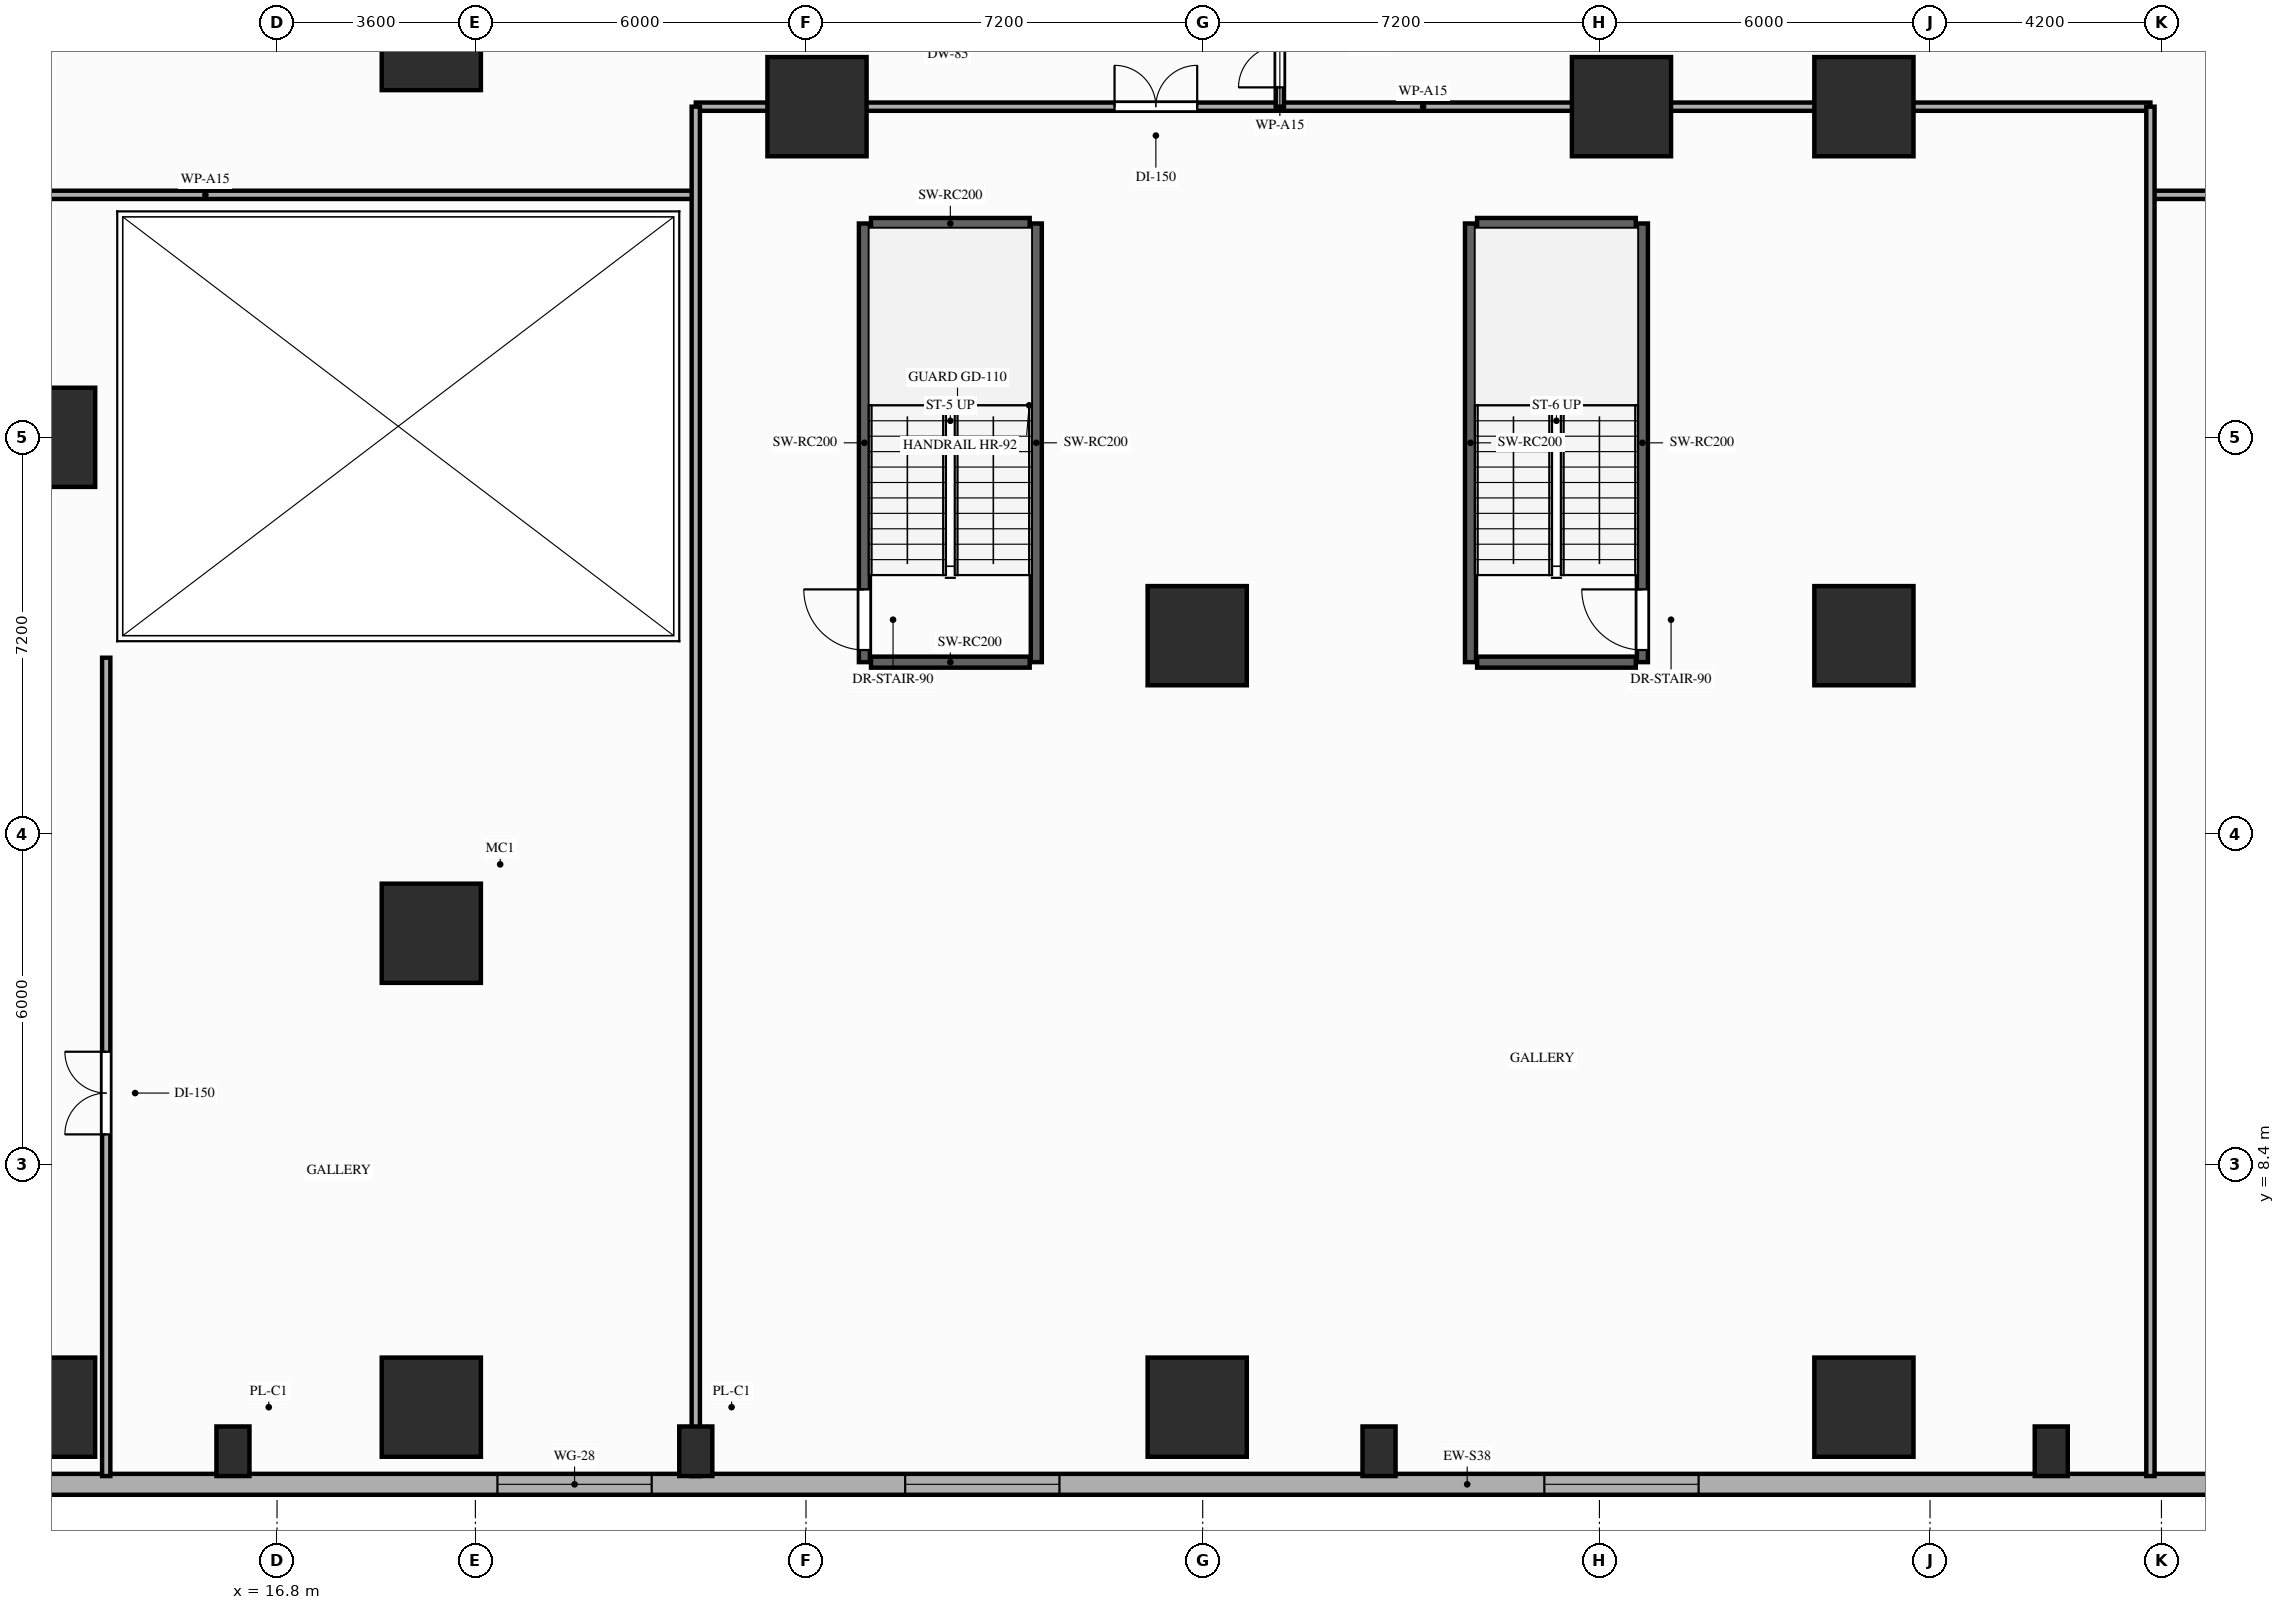
"""IFC4 building model, lengths in metres.
Left out: names, types, materials, properties, quantities, classifications, styles, units other than length and angle.
Written with IfcOpenShell. Run it as: python <this file> out.ifc"""

import sys

from ifc_helpers import new_model, si_unit, direction, frame, frame_2d, origin, origin_2d, place, context, subcontext, project, spatial, rectangle, extrude, element, fill, save


model = new_model("IFC4")
c1 = context("Model", 3, precision=1e-05, world=origin(), true_north=direction((0.0, 1.0)))
c2 = subcontext(c1, "Body", "Model", "MODEL_VIEW")
j1 = project(units=[si_unit("LENGTHUNIT", "METRE"), si_unit("PLANEANGLEUNIT", "RADIAN")], contexts=[c1])
p1 = place(None, origin())
s1 = spatial("IfcSite", under=j1, at=p1, CompositionType="ELEMENT")
p2 = place(p1, origin())
s2 = spatial("IfcBuilding", under=s1, at=p2, CompositionType="ELEMENT")
p3 = place(p2, frame((0.0, 0.0, 4.6)))
s3 = spatial("IfcBuildingStorey", under=s2, at=p3, CompositionType="ELEMENT", Elevation=4.6)
for number, where, z_axis, x_axis in (
    (1, (19.6, 12.6, 0.0), (0.0, 0.0, 1.0), (1.0, 0.0, 0.0)),
    (2, (19.6, 28.8, 0.0), (0.0, 0.0, 1.0), (1.0, 0.0, 0.0)),
    (3, (26.6, 27.6, 0.0), (0.0, 0.0, 1.0), (1.0, 0.0, 0.0)),
    (4, (41.2, 27.6, 0.0), (0.0, 0.0, 1.0), (1.0, 0.0, 0.0)),
    (5, (45.6, 27.6, 0.0), (0.0, 0.0, 1.0), (1.0, 0.0, 0.0)),
    (6, (12.6, 4.0, 0.0), (0.0, 0.0, 1.0), (1.0, 0.0, 0.0)),
    (7, (19.6, 4.0, 0.0), (0.0, 0.0, 1.0), (1.0, 0.0, 0.0)),
    (8, (33.5, 4.0, 0.0), (0.0, 0.0, 1.0), (1.0, 0.0, 0.0)),
    (9, (45.6, 4.0, 0.0), (0.0, 0.0, 1.0), (1.0, 0.0, 0.0)),
    (10, (12.6, 21.6, 0.0), (0.0, 0.0, 1.0), (1.0, 0.0, 0.0)),
    (11, (33.5, 18.0, 0.0), (0.0, 0.0, 1.0), (1.0, 0.0, 0.0)),
    (12, (45.6, 18.0, 0.0), (0.0, 0.0, 1.0), (1.0, 0.0, 0.0)),
):
    element("IfcColumn", number, at=place(p3, frame(where, z_axis=z_axis, x_axis=x_axis)), inside=s3, PredefinedType="COLUMN", context=c2, shape_type="SweptSolid", body=[
        extrude(rectangle(XDim=1.8, YDim=1.8, at=origin_2d()), origin(), (0.0, 0.0, 1.0), 4.2),
    ])
for number, where, z_axis, x_axis in (
    (13, (16.0, 3.2, 0.0), (0.0, 0.0, 1.0), (1.0, 0.0, 0.0)),
    (14, (24.4, 3.2, 0.0), (0.0, 0.0, 1.0), (1.0, 0.0, 0.0)),
    (15, (36.8, 3.2, 0.0), (0.0, 0.0, 1.0), (1.0, 0.0, 0.0)),
    (16, (49.0, 3.2, 0.0), (0.0, 0.0, 1.0), (1.0, 0.0, 0.0)),
):
    element("IfcColumn", number, at=place(p3, frame(where, z_axis=z_axis, x_axis=x_axis)), inside=s3, PredefinedType="PILASTER", context=c2, shape_type="SweptSolid", body=[
        extrude(rectangle(XDim=0.6, YDim=0.9, at=origin_2d()), origin(), (0.0, 0.0, 1.0), 4.2),
    ])
p4 = place(p3, frame((3.6, 2.6, 0.0), z_axis=(0.0, 0.0, 1.0), x_axis=(1.0, 0.0, 0.0)))
e17 = element("IfcWall", 17, at=p4, inside=s3, PredefinedType="STANDARD", context=c2, shape_type="SweptSolid", body=[
    extrude(rectangle(XDim=69.6, YDim=0.38, at=frame_2d((34.8, 0.0))), origin(), (0.0, 0.0, 1.0), 3.95),
])
p5 = place(p4, frame((17.2, 0.0, 0.9)))
e18 = element("IfcOpeningElement", 18, at=p5, cuts=e17, PredefinedType="OPENING", context=c2, shape_type="SweptSolid", body=[
    extrude(rectangle(XDim=2.8, YDim=2.2, at=frame_2d((1.4, 1.1))), frame((0.0, 0.2, 0.0), z_axis=(0.0, -1.0, 0.0), x_axis=(1.0, 0.0, 0.0)), (0.0, 0.0, 1.0), 0.4),
])
p6 = place(p4, frame((24.6, 0.0, 0.9)))
e19 = element("IfcOpeningElement", 19, at=p6, cuts=e17, PredefinedType="OPENING", context=c2, shape_type="SweptSolid", body=[
    extrude(rectangle(XDim=2.8, YDim=2.2, at=frame_2d((1.4, 1.1))), frame((0.0, 0.2, 0.0), z_axis=(0.0, -1.0, 0.0), x_axis=(1.0, 0.0, 0.0)), (0.0, 0.0, 1.0), 0.4),
])
p7 = place(p4, frame((36.2, 0.0, 0.9)))
e20 = element("IfcOpeningElement", 20, at=p7, cuts=e17, PredefinedType="OPENING", context=c2, shape_type="SweptSolid", body=[
    extrude(rectangle(XDim=2.8, YDim=2.2, at=frame_2d((1.4, 1.1))), frame((0.0, 0.2, 0.0), z_axis=(0.0, -1.0, 0.0), x_axis=(1.0, 0.0, 0.0)), (0.0, 0.0, 1.0), 0.4),
])
p8 = place(p4, frame((48.4, 0.0, 0.9)))
e21 = element("IfcOpeningElement", 21, at=p8, cuts=e17, PredefinedType="OPENING", context=c2, shape_type="SweptSolid", body=[
    extrude(rectangle(XDim=2.8, YDim=2.2, at=frame_2d((1.4, 1.1))), frame((0.0, 0.2, 0.0), z_axis=(0.0, -1.0, 0.0), x_axis=(1.0, 0.0, 0.0)), (0.0, 0.0, 1.0), 0.4),
])
p9 = place(p4, frame((64.0, 0.0, 0.9)))
e22 = element("IfcOpeningElement", 22, at=p9, cuts=e17, PredefinedType="OPENING", context=c2, shape_type="SweptSolid", body=[
    extrude(rectangle(XDim=2.8, YDim=2.2, at=frame_2d((1.4, 1.1))), frame((0.0, 0.2, 0.0), z_axis=(0.0, -1.0, 0.0), x_axis=(1.0, 0.0, 0.0)), (0.0, 0.0, 1.0), 0.4),
])
p10 = place(p3, frame((27.46, 17.52, 0.0), z_axis=(0.0, 0.0, 1.0), x_axis=(0.0, 1.0, 0.0)))
e23 = element("IfcWall", 23, at=p10, inside=s3, PredefinedType="SHEAR", context=c2, shape_type="SweptSolid", body=[
    extrude(rectangle(XDim=7.96, YDim=0.2, at=frame_2d((3.98, 0.0))), origin(), (0.0, 0.0, 1.0), 3.95),
])
p11 = place(p10, frame((0.22, 0.0, 0.0)))
e24 = element("IfcOpeningElement", 24, at=p11, cuts=e23, PredefinedType="OPENING", context=c2, shape_type="SweptSolid", body=[
    extrude(rectangle(XDim=1.1, YDim=2.15, at=frame_2d((0.55, 1.075))), frame((0.0, 0.11, 0.0), z_axis=(0.0, -1.0, 0.0), x_axis=(1.0, 0.0, 0.0)), (0.0, 0.0, 1.0), 0.22),
])
p12 = place(p3, frame((30.58, 17.52, 0.0), z_axis=(0.0, 0.0, 1.0), x_axis=(0.0, 1.0, 0.0)))
e25 = element("IfcWall", 25, at=p12, inside=s3, PredefinedType="SHEAR", context=c2, shape_type="SweptSolid", body=[
    extrude(rectangle(XDim=7.96, YDim=0.2, at=frame_2d((3.98, 0.0))), origin(), (0.0, 0.0, 1.0), 3.95),
])
for number, where, z_axis, x_axis in (
    (26, (27.58, 25.48, 0.0), (0.0, 0.0, 1.0), (1.0, 0.0, 0.0)),
    (27, (27.58, 17.52, 0.0), (0.0, 0.0, 1.0), (1.0, 0.0, 0.0)),
):
    element("IfcWall", number, at=place(p3, frame(where, z_axis=z_axis, x_axis=x_axis)), inside=s3, PredefinedType="SHEAR", context=c2, shape_type="SweptSolid", body=[
        extrude(rectangle(XDim=2.88, YDim=0.2, at=frame_2d((1.44, 0.0))), origin(), (0.0, 0.0, 1.0), 3.95),
    ])
p13 = place(p3, frame((38.46, 17.52, 0.0), z_axis=(0.0, 0.0, 1.0), x_axis=(0.0, 1.0, 0.0)))
e28 = element("IfcWall", 28, at=p13, inside=s3, PredefinedType="SHEAR", context=c2, shape_type="SweptSolid", body=[
    extrude(rectangle(XDim=7.96, YDim=0.2, at=frame_2d((3.98, 0.0))), origin(), (0.0, 0.0, 1.0), 3.95),
])
p14 = place(p3, frame((41.58, 17.52, 0.0), z_axis=(0.0, 0.0, 1.0), x_axis=(0.0, 1.0, 0.0)))
e29 = element("IfcWall", 29, at=p14, inside=s3, PredefinedType="SHEAR", context=c2, shape_type="SweptSolid", body=[
    extrude(rectangle(XDim=7.96, YDim=0.2, at=frame_2d((3.98, 0.0))), origin(), (0.0, 0.0, 1.0), 3.95),
])
p15 = place(p14, frame((0.22, 0.0, 0.0)))
e30 = element("IfcOpeningElement", 30, at=p15, cuts=e29, PredefinedType="OPENING", context=c2, shape_type="SweptSolid", body=[
    extrude(rectangle(XDim=1.1, YDim=2.15, at=frame_2d((0.55, 1.075))), frame((0.0, 0.11, 0.0), z_axis=(0.0, -1.0, 0.0), x_axis=(1.0, 0.0, 0.0)), (0.0, 0.0, 1.0), 0.22),
])
for number, where, z_axis, x_axis in (
    (31, (38.58, 25.48, 0.0), (0.0, 0.0, 1.0), (1.0, 0.0, 0.0)),
    (32, (38.58, 17.52, 0.0), (0.0, 0.0, 1.0), (1.0, 0.0, 0.0)),
):
    element("IfcWall", number, at=place(p3, frame(where, z_axis=z_axis, x_axis=x_axis)), inside=s3, PredefinedType="SHEAR", context=c2, shape_type="SweptSolid", body=[
        extrude(rectangle(XDim=2.88, YDim=0.2, at=frame_2d((1.44, 0.0))), origin(), (0.0, 0.0, 1.0), 3.95),
    ])
p16 = place(p3, frame((6.6, 26.0, 0.0), z_axis=(0.0, 0.0, 1.0), x_axis=(1.0, 0.0, 0.0)))
e33 = element("IfcWall", 33, at=p16, inside=s3, PredefinedType="PARTITIONING", context=c2, shape_type="SweptSolid", body=[
    extrude(rectangle(XDim=17.8, YDim=0.15, at=frame_2d((8.9, 0.0))), origin(), (0.0, 0.0, 1.0), 3.23),
])
p17 = place(p3, frame((24.4, 27.6, 0.0), z_axis=(0.0, 0.0, 1.0), x_axis=(1.0, 0.0, 0.0)))
e34 = element("IfcWall", 34, at=p17, inside=s3, PredefinedType="PARTITIONING", context=c2, shape_type="SweptSolid", body=[
    extrude(rectangle(XDim=26.4, YDim=0.15, at=frame_2d((13.2, 0.0))), origin(), (0.0, 0.0, 1.0), 3.23),
])
p18 = place(p17, frame((7.6, 0.0, 0.0)))
e35 = element("IfcOpeningElement", 35, at=p18, cuts=e34, PredefinedType="OPENING", context=c2, shape_type="SweptSolid", body=[
    extrude(rectangle(XDim=1.5, YDim=2.18, at=frame_2d((0.75, 1.09))), frame((0.0, 0.085, 0.0), z_axis=(0.0, -1.0, 0.0), x_axis=(1.0, 0.0, 0.0)), (0.0, 0.0, 1.0), 0.17),
])
p19 = place(p3, frame((50.8, 26.0, 0.0), z_axis=(0.0, 0.0, 1.0), x_axis=(1.0, 0.0, 0.0)))
e36 = element("IfcWall", 36, at=p19, inside=s3, PredefinedType="PARTITIONING", context=c2, shape_type="SweptSolid", body=[
    extrude(rectangle(XDim=11.6, YDim=0.15, at=frame_2d((5.8, 0.0))), origin(), (0.0, 0.0, 1.0), 3.23),
])
p20 = place(p19, frame((3.7, 0.0, 0.0)))
e37 = element("IfcOpeningElement", 37, at=p20, cuts=e36, PredefinedType="OPENING", context=c2, shape_type="SweptSolid", body=[
    extrude(rectangle(XDim=1.5, YDim=2.18, at=frame_2d((0.75, 1.09))), frame((0.0, 0.085, 0.0), z_axis=(0.0, -1.0, 0.0), x_axis=(1.0, 0.0, 0.0)), (0.0, 0.0, 1.0), 0.17),
])
p21 = place(p3, frame((35.0, 27.6, 0.0), z_axis=(0.0, 0.0, 1.0), x_axis=(0.0, 1.0, 0.0)))
e38 = element("IfcWall", 38, at=p21, inside=s3, PredefinedType="PARTITIONING", context=c2, shape_type="SweptSolid", body=[
    extrude(rectangle(XDim=2.2, YDim=0.15, at=frame_2d((1.1, 0.0))), origin(), (0.0, 0.0, 1.0), 3.23),
])
p22 = place(p21, frame((0.35, 0.0, 0.0)))
e39 = element("IfcOpeningElement", 39, at=p22, cuts=e38, PredefinedType="OPENING", context=c2, shape_type="SweptSolid", body=[
    extrude(rectangle(XDim=1.5, YDim=2.18, at=frame_2d((0.75, 1.09))), frame((0.0, 0.085, 0.0), z_axis=(0.0, -1.0, 0.0), x_axis=(1.0, 0.0, 0.0)), (0.0, 0.0, 1.0), 0.17),
])
for number, where, z_axis, x_axis in (
    (40, (24.4, 2.75, 0.0), (0.0, 0.0, 1.0), (0.0, 1.0, 0.0)),
    (41, (50.8, 2.75, 0.0), (0.0, 0.0, 1.0), (0.0, 1.0, 0.0)),
):
    element("IfcWall", number, at=place(p3, frame(where, z_axis=z_axis, x_axis=x_axis)), inside=s3, PredefinedType="PARTITIONING", context=c2, shape_type="SweptSolid", body=[
        extrude(rectangle(XDim=24.85, YDim=0.15, at=frame_2d((12.425, 0.0))), origin(), (0.0, 0.0, 1.0), 3.03),
    ])
p23 = place(p3, frame((13.7, 2.75, 0.0), z_axis=(0.0, 0.0, 1.0), x_axis=(0.0, 1.0, 0.0)))
e42 = element("IfcWall", 42, at=p23, inside=s3, PredefinedType="PARTITIONING", context=c2, shape_type="SweptSolid", body=[
    extrude(rectangle(XDim=14.85, YDim=0.15, at=frame_2d((7.425, 0.0))), origin(), (0.0, 0.0, 1.0), 3.03),
])
p24 = place(p23, frame((6.2, 0.0, 0.0)))
e43 = element("IfcOpeningElement", 43, at=p24, cuts=e42, PredefinedType="OPENING", context=c2, shape_type="SweptSolid", body=[
    extrude(rectangle(XDim=1.5, YDim=2.18, at=frame_2d((0.75, 1.09))), frame((0.0, 0.085, 0.0), z_axis=(0.0, -1.0, 0.0), x_axis=(1.0, 0.0, 0.0)), (0.0, 0.0, 1.0), 0.17),
])
p25 = place(p5, origin())
e44 = element("IfcWindow", 44, at=p25, inside=s3, PartitioningType="SINGLE_PANEL", PredefinedType="WINDOW", context=c2, shape_type="SweptSolid", body=[
    extrude(rectangle(XDim=2.8, YDim=2.2, at=frame_2d((1.4, 1.1))), frame((0.0, 0.03, 0.0), z_axis=(0.0, -1.0, 0.0), x_axis=(1.0, 0.0, 0.0)), (0.0, 0.0, 1.0), 0.06),
])
fill(e18, e44)
p26 = place(p6, origin())
e45 = element("IfcWindow", 45, at=p26, inside=s3, PartitioningType="SINGLE_PANEL", PredefinedType="WINDOW", context=c2, shape_type="SweptSolid", body=[
    extrude(rectangle(XDim=2.8, YDim=2.2, at=frame_2d((1.4, 1.1))), frame((0.0, 0.03, 0.0), z_axis=(0.0, -1.0, 0.0), x_axis=(1.0, 0.0, 0.0)), (0.0, 0.0, 1.0), 0.06),
])
fill(e19, e45)
p27 = place(p7, origin())
e46 = element("IfcWindow", 46, at=p27, inside=s3, PartitioningType="SINGLE_PANEL", PredefinedType="WINDOW", context=c2, shape_type="SweptSolid", body=[
    extrude(rectangle(XDim=2.8, YDim=2.2, at=frame_2d((1.4, 1.1))), frame((0.0, 0.03, 0.0), z_axis=(0.0, -1.0, 0.0), x_axis=(1.0, 0.0, 0.0)), (0.0, 0.0, 1.0), 0.06),
])
fill(e20, e46)
p28 = place(p11, origin())
e47 = element("IfcDoor", 47, at=p28, inside=s3, OperationType="SINGLE_SWING_RIGHT", PredefinedType="DOOR", context=c2, shape_type="SweptSolid", body=[
    extrude(rectangle(XDim=1.1, YDim=2.15, at=frame_2d((0.55, 1.075))), frame((0.0, 0.025, 0.0), z_axis=(0.0, -1.0, 0.0), x_axis=(1.0, 0.0, 0.0)), (0.0, 0.0, 1.0), 0.05),
])
fill(e24, e47)
p29 = place(p15, origin())
e48 = element("IfcDoor", 48, at=p29, inside=s3, OperationType="SINGLE_SWING_RIGHT", PredefinedType="DOOR", context=c2, shape_type="SweptSolid", body=[
    extrude(rectangle(XDim=1.1, YDim=2.15, at=frame_2d((0.55, 1.075))), frame((0.0, 0.025, 0.0), z_axis=(0.0, -1.0, 0.0), x_axis=(1.0, 0.0, 0.0)), (0.0, 0.0, 1.0), 0.05),
])
fill(e30, e48)
p30 = place(p24, origin())
e49 = element("IfcDoor", 49, at=p30, inside=s3, OperationType="DOUBLE_DOOR_SINGLE_SWING", PredefinedType="DOOR", context=c2, shape_type="SweptSolid", body=[
    extrude(rectangle(XDim=1.5, YDim=2.18, at=frame_2d((0.75, 1.09))), frame((0.0, 0.025, 0.0), z_axis=(0.0, -1.0, 0.0), x_axis=(1.0, 0.0, 0.0)), (0.0, 0.0, 1.0), 0.05),
])
fill(e43, e49)
p31 = place(p22, origin())
e50 = element("IfcDoor", 50, at=p31, inside=s3, OperationType="DOUBLE_DOOR_SINGLE_SWING", PredefinedType="DOOR", context=c2, shape_type="SweptSolid", body=[
    extrude(rectangle(XDim=1.5, YDim=2.18, at=frame_2d((0.75, 1.09))), frame((0.0, 0.025, 0.0), z_axis=(0.0, -1.0, 0.0), x_axis=(1.0, 0.0, 0.0)), (0.0, 0.0, 1.0), 0.05),
])
fill(e39, e50)
p32 = place(p18, origin())
e51 = element("IfcDoor", 51, at=p32, inside=s3, OperationType="DOUBLE_DOOR_SINGLE_SWING", PredefinedType="DOOR", context=c2, shape_type="SweptSolid", body=[
    extrude(rectangle(XDim=1.5, YDim=2.18, at=frame_2d((0.75, 1.09))), frame((0.0, 0.025, 0.0), z_axis=(0.0, -1.0, 0.0), x_axis=(1.0, 0.0, 0.0)), (0.0, 0.0, 1.0), 0.05),
])
fill(e35, e51)
save(model, sys.argv[1])
